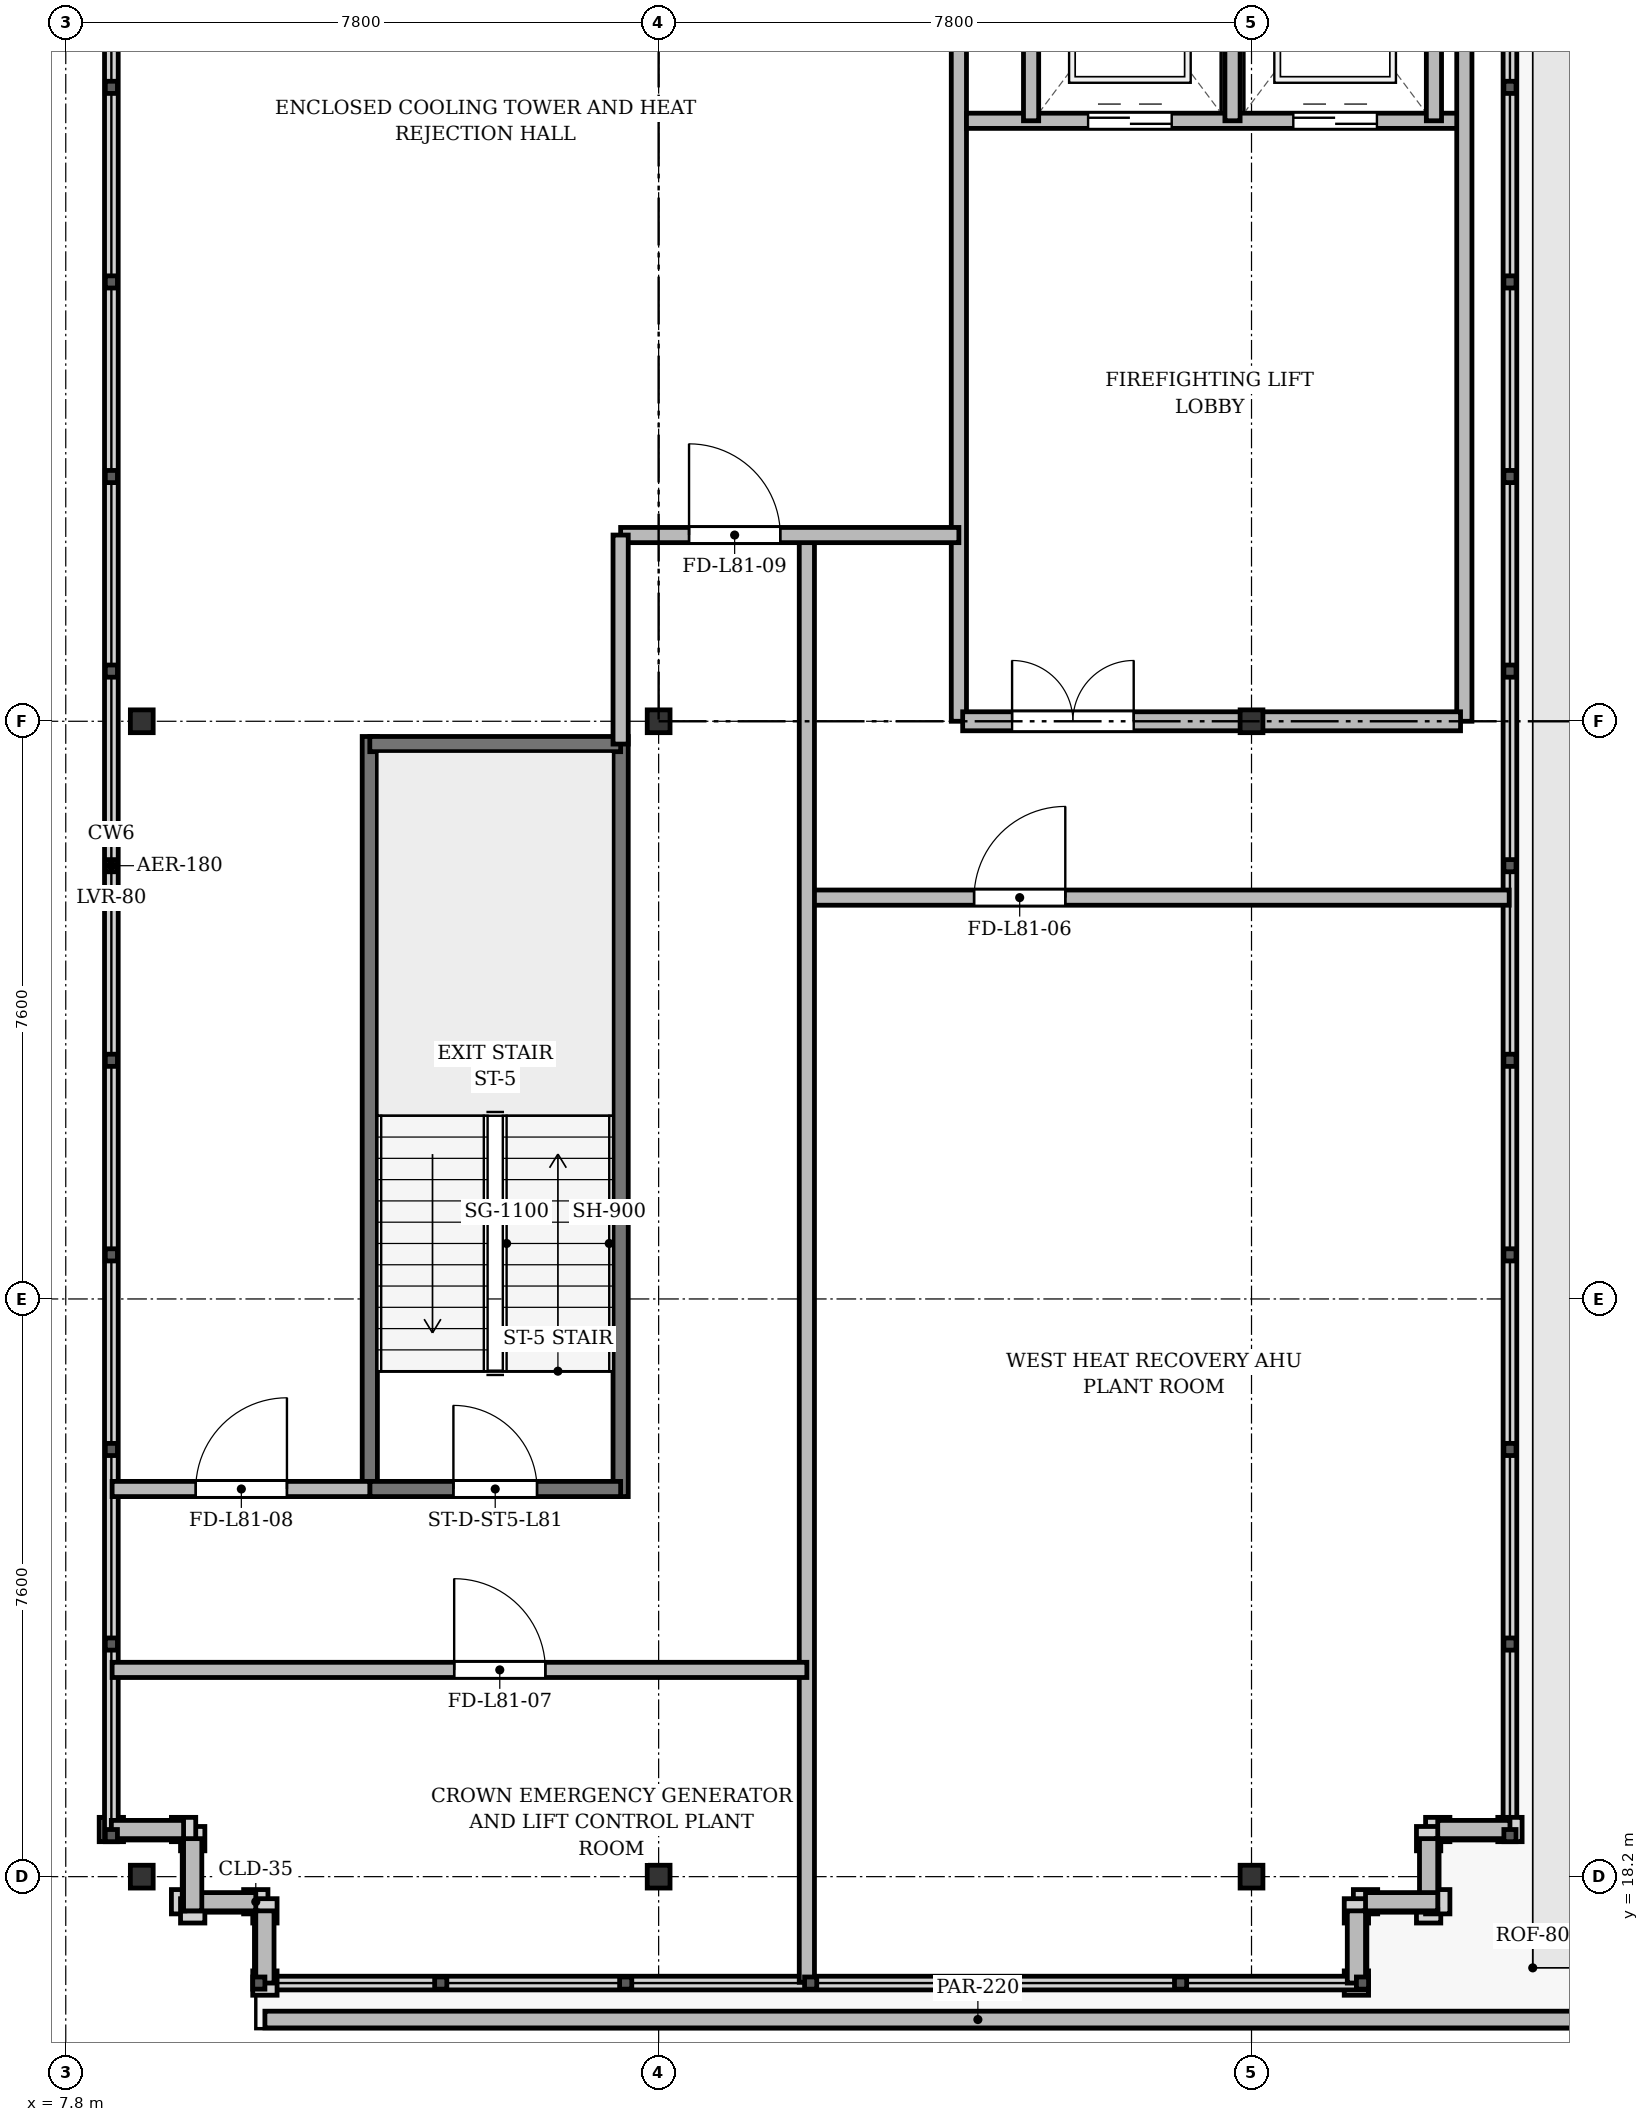
"""IFC4 building model, lengths in metres.
Left out: names, types, materials, properties, quantities, classifications, styles, units other than length and angle.
Written with IfcOpenShell. Run it as: python <this file> out.ifc"""

import sys

from ifc_helpers import new_model, si_unit, direction, frame, frame_2d, origin, origin_2d, place, context, subcontext, project, spatial, rectangle, i_section, extrude, source, transform, mapped, element, fill, save


model = new_model("IFC4")
c1 = context("Model", 3, precision=1e-05, world=origin(), true_north=direction((0.0, 1.0)))
c2 = subcontext(c1, "Body", "Model", "MODEL_VIEW")
j1 = project(units=[si_unit("LENGTHUNIT", "METRE"), si_unit("PLANEANGLEUNIT", "RADIAN")], contexts=[c1])
p1 = place(None, origin())
s1 = spatial("IfcSite", under=j1, at=p1, CompositionType="ELEMENT")
p2 = place(p1, origin())
s2 = spatial("IfcBuilding", under=s1, at=p2, CompositionType="ELEMENT")
p3 = place(p2, frame((0.0, 0.0, 312.3)))
s3 = spatial("IfcBuildingStorey", under=s2, at=p3, CompositionType="ELEMENT", Elevation=312.3)
m1 = source(origin(), c2, "Body", "SweptSolid", [
    extrude(i_section(OverallWidth=0.3, OverallDepth=0.3, WebThickness=0.015, FlangeThickness=0.024, at=origin_2d()), origin(), (0.0, 0.0, 1.0), 4.4),
])
for number, where, z_axis, x_axis in (
    (1, (8.8, 18.2, 0.0), (0.0, 0.0, 1.0), (1.0, 0.0, 0.0)),
    (2, (8.8, 33.4, 0.0), (0.0, 0.0, 1.0), (1.0, 0.0, 0.0)),
    (3, (15.6, 18.2, 0.0), (0.0, 0.0, 1.0), (1.0, 0.0, 0.0)),
    (4, (15.6, 33.4, 0.0), (0.0, 0.0, 1.0), (1.0, 0.0, 0.0)),
    (5, (23.4, 18.2, 0.0), (0.0, 0.0, 1.0), (1.0, 0.0, 0.0)),
    (6, (23.4, 33.4, 0.0), (0.0, 0.0, 1.0), (1.0, 0.0, 0.0)),
):
    element("IfcColumn", number, at=place(p3, frame(where, z_axis=z_axis, x_axis=x_axis)), inside=s3, PredefinedType="COLUMN", context=c2, shape_type="MappedRepresentation", body=[
        mapped(m1, transform((0.0, 0.0, 0.0), x_axis=(1.0, 0.0, 0.0), y_axis=(0.0, 1.0, 0.0), z_axis=(0.0, 0.0, 1.0), scale=1.0)),
    ])
p4 = place(p3, frame((10.3, 17.87, 0.0), z_axis=(0.0, 0.0, 1.0), x_axis=(-1.0, 0.0, 0.0)))
e7 = element("IfcWall", 7, at=p4, inside=s3, PredefinedType="SOLIDWALL", context=c2, shape_type="SweptSolid", body=[
    extrude(rectangle(XDim=0.95, YDim=0.24, at=frame_2d((0.475, 0.0))), origin(), (0.0, 0.0, 1.0), 4.11),
])
p5 = place(p3, frame((9.47, 17.75, 0.0), z_axis=(0.0, 0.0, 1.0), x_axis=(0.0, 1.0, 0.0)))
e8 = element("IfcWall", 8, at=p5, inside=s3, PredefinedType="SOLIDWALL", context=c2, shape_type="SweptSolid", body=[
    extrude(rectangle(XDim=0.95, YDim=0.24, at=frame_2d((0.475, 0.0))), origin(), (0.0, 0.0, 1.0), 3.61),
])
p6 = place(p3, frame((9.35, 18.82, 0.0), z_axis=(0.0, 0.0, 1.0), x_axis=(-1.0, 0.0, 0.0)))
e9 = element("IfcWall", 9, at=p6, inside=s3, PredefinedType="SOLIDWALL", context=c2, shape_type="SweptSolid", body=[
    extrude(rectangle(XDim=0.95, YDim=0.24, at=frame_2d((0.475, 0.0))), origin(), (0.0, 0.0, 1.0), 3.61),
])
p7 = place(p3, frame((26.8, 18.82, 0.0), z_axis=(0.0, 0.0, 1.0), x_axis=(-1.0, 0.0, 0.0)))
e10 = element("IfcWall", 10, at=p7, inside=s3, PredefinedType="SOLIDWALL", context=c2, shape_type="SweptSolid", body=[
    extrude(rectangle(XDim=0.95, YDim=0.24, at=frame_2d((0.475, 0.0))), origin(), (0.0, 0.0, 1.0), 4.11),
])
p8 = place(p3, frame((25.73, 18.7, 0.0), z_axis=(0.0, 0.0, 1.0), x_axis=(0.0, -1.0, 0.0)))
e11 = element("IfcWall", 11, at=p8, inside=s3, PredefinedType="SOLIDWALL", context=c2, shape_type="SweptSolid", body=[
    extrude(rectangle(XDim=0.95, YDim=0.24, at=frame_2d((0.475, 0.0))), origin(), (0.0, 0.0, 1.0), 3.61),
])
p9 = place(p3, frame((25.85, 17.87, 0.0), z_axis=(0.0, 0.0, 1.0), x_axis=(-1.0, 0.0, 0.0)))
e12 = element("IfcWall", 12, at=p9, inside=s3, PredefinedType="SOLIDWALL", context=c2, shape_type="SweptSolid", body=[
    extrude(rectangle(XDim=0.95, YDim=0.24, at=frame_2d((0.475, 0.0))), origin(), (0.0, 0.0, 1.0), 4.11),
])
for number, where, z_axis, x_axis in (
    (13, (24.78, 17.75, 0.0), (0.0, 0.0, 1.0), (0.0, -1.0, 0.0)),
    (14, (10.42, 16.8, 0.0), (0.0, 0.0, 1.0), (0.0, 1.0, 0.0)),
):
    element("IfcWall", number, at=place(p3, frame(where, z_axis=z_axis, x_axis=x_axis)), inside=s3, PredefinedType="SOLIDWALL", context=c2, shape_type="SweptSolid", body=[
        extrude(rectangle(XDim=0.95, YDim=0.24, at=frame_2d((0.475, 0.0))), origin(), (0.0, 0.0, 1.0), 4.11),
    ])
p10 = place(p3, frame((29.18, 16.32, 0.0), z_axis=(0.0, 0.0, 1.0), x_axis=(-1.0, 0.0, 0.0)))
e15 = element("IfcWall", 15, at=p10, inside=s3, PredefinedType="PARAPET", context=c2, shape_type="SweptSolid", body=[
    extrude(rectangle(XDim=18.76, YDim=0.22, at=frame_2d((9.38, 0.0))), origin(), (0.0, 0.0, 1.0), 1.08),
])
for number, where, z_axis, x_axis in (
    (16, (11.8, 23.2, 0.0), (0.0, 0.0, 1.0), (0.0, 1.0, 0.0)),
    (17, (15.1, 23.2, 0.0), (0.0, 0.0, 1.0), (0.0, 1.0, 0.0)),
):
    element("IfcWall", number, at=place(p3, frame(where, z_axis=z_axis, x_axis=x_axis)), inside=s3, PredefinedType="SHEAR", context=c2, shape_type="SweptSolid", body=[
        extrude(rectangle(XDim=10.0, YDim=0.2, at=frame_2d((5.0, 0.0))), origin(), (0.0, 0.0, 1.0), 4.11),
    ])
p11 = place(p3, frame((11.8, 33.1, 0.0), z_axis=(0.0, 0.0, 1.0), x_axis=(1.0, 0.0, 0.0)))
e18 = element("IfcWall", 18, at=p11, inside=s3, PredefinedType="SHEAR", context=c2, shape_type="SweptSolid", body=[
    extrude(rectangle(XDim=3.3, YDim=0.2, at=frame_2d((1.65, 0.0))), origin(), (0.0, 0.0, 1.0), 4.11),
])
p12 = place(p3, frame((11.8, 23.3, 0.0), z_axis=(0.0, 0.0, 1.0), x_axis=(1.0, 0.0, 0.0)))
e19 = element("IfcWall", 19, at=p12, inside=s3, PredefinedType="SHEAR", context=c2, shape_type="SweptSolid", body=[
    extrude(rectangle(XDim=3.3, YDim=0.2, at=frame_2d((1.65, 0.0))), origin(), (0.0, 0.0, 1.0), 4.11),
])
p13 = place(p12, frame((1.1, 0.0, 0.0)))
e20 = element("IfcOpeningElement", 20, at=p13, cuts=e19, PredefinedType="OPENING", context=c2, shape_type="SweptSolid", body=[
    extrude(rectangle(XDim=1.1, YDim=2.15, at=frame_2d((0.55, 1.075))), frame((0.0, 0.11, 0.0), z_axis=(0.0, -1.0, 0.0), x_axis=(1.0, 0.0, 0.0)), (0.0, 0.0, 1.0), 0.22),
])
p14 = place(p3, frame((19.55, 33.4, 0.0), z_axis=(0.0, 0.0, 1.0), x_axis=(0.0, 1.0, 0.0)))
e21 = element("IfcWall", 21, at=p14, inside=s3, PredefinedType="PARTITIONING", context=c2, shape_type="SweptSolid", body=[
    extrude(rectangle(XDim=11.3, YDim=0.2, at=frame_2d((5.65, 0.0))), origin(), (0.0, 0.0, 1.0), 3.61),
])
p15 = place(p3, frame((19.65, 41.3, 0.0), z_axis=(0.0, 0.0, 1.0), x_axis=(1.0, 0.0, 0.0)))
e22 = element("IfcWall", 22, at=p15, inside=s3, PredefinedType="SOLIDWALL", context=c2, shape_type="SweptSolid", body=[
    extrude(rectangle(XDim=6.5, YDim=0.2, at=frame_2d((3.25, 0.0))), origin(), (0.0, 0.0, 1.0), 4.11),
])
p16 = place(p15, frame((1.6, 0.0, 0.0)))
e23 = element("IfcOpeningElement", 23, at=p16, cuts=e22, PredefinedType="OPENING", context=c2, shape_type="SweptSolid", body=[
    extrude(rectangle(XDim=1.1, YDim=2.15, at=frame_2d((0.55, 1.075))), frame((0.0, 0.11, 0.0), z_axis=(0.0, -1.0, 0.0), x_axis=(1.0, 0.0, 0.0)), (0.0, 0.0, 1.0), 0.22),
])
p17 = place(p15, frame((4.3, 0.0, 0.0)))
e24 = element("IfcOpeningElement", 24, at=p17, cuts=e22, PredefinedType="OPENING", context=c2, shape_type="SweptSolid", body=[
    extrude(rectangle(XDim=1.1, YDim=2.15, at=frame_2d((0.55, 1.075))), frame((0.0, 0.11, 0.0), z_axis=(0.0, -1.0, 0.0), x_axis=(1.0, 0.0, 0.0)), (0.0, 0.0, 1.0), 0.22),
])
for number, where, z_axis, x_axis in (
    (25, (20.5, 41.3, 0.0), (0.0, 0.0, 1.0), (0.0, 1.0, 0.0)),
    (26, (23.15, 41.3, 0.0), (0.0, 0.0, 1.0), (0.0, 1.0, 0.0)),
):
    element("IfcWall", number, at=place(p3, frame(where, z_axis=z_axis, x_axis=x_axis)), inside=s3, PredefinedType="SOLIDWALL", context=c2, shape_type="SweptSolid", body=[
        extrude(rectangle(XDim=3.4, YDim=0.2, at=frame_2d((1.7, 0.0))), origin(), (0.0, 0.0, 1.0), 4.11),
    ])
p18 = place(p3, frame((25.8, 41.3, 0.0), z_axis=(0.0, 0.0, 1.0), x_axis=(0.0, 1.0, 0.0)))
e27 = element("IfcWall", 27, at=p18, inside=s3, PredefinedType="SOLIDWALL", context=c2, shape_type="SweptSolid", body=[
    extrude(rectangle(XDim=2.86, YDim=0.2, at=frame_2d((1.43, 0.0))), origin(), (0.0, 0.0, 1.0), 4.11),
])
p19 = place(p3, frame((26.2, 33.4, 0.0), z_axis=(0.0, 0.0, 1.0), x_axis=(0.0, 1.0, 0.0)))
e28 = element("IfcWall", 28, at=p19, inside=s3, PredefinedType="SOLIDWALL", context=c2, shape_type="SweptSolid", body=[
    extrude(rectangle(XDim=10.76, YDim=0.2, at=frame_2d((5.38, 0.0))), origin(), (0.0, 0.0, 1.0), 3.61),
])
p20 = place(p3, frame((19.6, 33.4, 0.0), z_axis=(0.0, 0.0, 1.0), x_axis=(1.0, 0.0, 0.0)))
e29 = element("IfcWall", 29, at=p20, inside=s3, PredefinedType="PARTITIONING", context=c2, shape_type="SweptSolid", body=[
    extrude(rectangle(XDim=6.55, YDim=0.25, at=frame_2d((3.275, 0.0))), origin(), (0.0, 0.0, 1.0), 3.61),
])
p21 = place(p20, frame((0.65, 0.0, 0.0)))
e30 = element("IfcOpeningElement", 30, at=p21, cuts=e29, PredefinedType="OPENING", context=c2, shape_type="SweptSolid", body=[
    extrude(rectangle(XDim=1.6, YDim=2.2, at=frame_2d((0.8, 1.1))), frame((0.0, 0.135, 0.0), z_axis=(0.0, -1.0, 0.0), x_axis=(1.0, 0.0, 0.0)), (0.0, 0.0, 1.0), 0.27),
])
p22 = place(p3, frame((17.55, 31.08, 0.0), z_axis=(0.0, 0.0, 1.0), x_axis=(1.0, 0.0, 0.0)))
e31 = element("IfcWall", 31, at=p22, inside=s3, PredefinedType="PARTITIONING", context=c2, shape_type="SweptSolid", body=[
    extrude(rectangle(XDim=9.24, YDim=0.2, at=frame_2d((4.62, 0.0))), origin(), (0.0, 0.0, 1.0), 3.61),
])
p23 = place(p22, frame((2.2, 0.0, 0.0)))
e32 = element("IfcOpeningElement", 32, at=p23, cuts=e31, PredefinedType="OPENING", context=c2, shape_type="SweptSolid", body=[
    extrude(rectangle(XDim=1.2, YDim=2.15, at=frame_2d((0.6, 1.075))), frame((0.0, 0.11, 0.0), z_axis=(0.0, -1.0, 0.0), x_axis=(1.0, 0.0, 0.0)), (0.0, 0.0, 1.0), 0.22),
])
p24 = place(p3, frame((17.55, 16.81, 0.0), z_axis=(0.0, 0.0, 1.0), x_axis=(0.0, 1.0, 0.0)))
e33 = element("IfcWall", 33, at=p24, inside=s3, PredefinedType="PARTITIONING", context=c2, shape_type="SweptSolid", body=[
    extrude(rectangle(XDim=19.04, YDim=0.2, at=frame_2d((9.52, 0.0))), origin(), (0.0, 0.0, 1.0), 3.61),
])
p25 = place(p3, frame((8.41, 20.92, 0.0), z_axis=(0.0, 0.0, 1.0), x_axis=(1.0, 0.0, 0.0)))
e34 = element("IfcWall", 34, at=p25, inside=s3, PredefinedType="PARTITIONING", context=c2, shape_type="SweptSolid", body=[
    extrude(rectangle(XDim=9.14, YDim=0.2, at=frame_2d((4.57, 0.0))), origin(), (0.0, 0.0, 1.0), 3.61),
])
p26 = place(p25, frame((4.5, 0.0, 0.0)))
e35 = element("IfcOpeningElement", 35, at=p26, cuts=e34, PredefinedType="OPENING", context=c2, shape_type="SweptSolid", body=[
    extrude(rectangle(XDim=1.2, YDim=2.15, at=frame_2d((0.6, 1.075))), frame((0.0, 0.11, 0.0), z_axis=(0.0, -1.0, 0.0), x_axis=(1.0, 0.0, 0.0)), (0.0, 0.0, 1.0), 0.22),
])
p27 = place(p3, frame((8.41, 23.3, 0.0), z_axis=(0.0, 0.0, 1.0), x_axis=(1.0, 0.0, 0.0)))
e36 = element("IfcWall", 36, at=p27, inside=s3, PredefinedType="PARTITIONING", context=c2, shape_type="SweptSolid", body=[
    extrude(rectangle(XDim=3.39, YDim=0.2, at=frame_2d((1.695, 0.0))), origin(), (0.0, 0.0, 1.0), 3.61),
])
p28 = place(p27, frame((1.1, 0.0, 0.0)))
e37 = element("IfcOpeningElement", 37, at=p28, cuts=e36, PredefinedType="OPENING", context=c2, shape_type="SweptSolid", body=[
    extrude(rectangle(XDim=1.2, YDim=2.15, at=frame_2d((0.6, 1.075))), frame((0.0, 0.11, 0.0), z_axis=(0.0, -1.0, 0.0), x_axis=(1.0, 0.0, 0.0)), (0.0, 0.0, 1.0), 0.22),
])
p29 = place(p3, frame((15.1, 35.85, 0.0), z_axis=(0.0, 0.0, 1.0), x_axis=(1.0, 0.0, 0.0)))
e38 = element("IfcWall", 38, at=p29, inside=s3, PredefinedType="PARTITIONING", context=c2, shape_type="SweptSolid", body=[
    extrude(rectangle(XDim=4.45, YDim=0.2, at=frame_2d((2.225, 0.0))), origin(), (0.0, 0.0, 1.0), 3.61),
])
p30 = place(p29, frame((0.9, 0.0, 0.0)))
e39 = element("IfcOpeningElement", 39, at=p30, cuts=e38, PredefinedType="OPENING", context=c2, shape_type="SweptSolid", body=[
    extrude(rectangle(XDim=1.2, YDim=2.15, at=frame_2d((0.6, 1.075))), frame((0.0, 0.11, 0.0), z_axis=(0.0, -1.0, 0.0), x_axis=(1.0, 0.0, 0.0)), (0.0, 0.0, 1.0), 0.22),
])
p31 = place(p3, frame((15.1, 33.1, 0.0), z_axis=(0.0, 0.0, 1.0), x_axis=(0.0, 1.0, 0.0)))
e40 = element("IfcWall", 40, at=p31, inside=s3, PredefinedType="PARTITIONING", context=c2, shape_type="SweptSolid", body=[
    extrude(rectangle(XDim=2.75, YDim=0.2, at=frame_2d((1.375, 0.0))), origin(), (0.0, 0.0, 1.0), 3.61),
])
m2 = source(origin(), c2, "Body", "SweptSolid", [
    extrude(rectangle(XDim=1.1, YDim=2.15, at=frame_2d((0.55, 1.075))), frame((0.0, 0.025, 0.0), z_axis=(0.0, -1.0, 0.0), x_axis=(1.0, 0.0, 0.0)), (0.0, 0.0, 1.0), 0.05),
])
p32 = place(p13, origin())
e41 = element("IfcDoor", 41, at=p32, inside=s3, OperationType="SINGLE_SWING_LEFT", PredefinedType="DOOR", context=c2, shape_type="MappedRepresentation", body=[
    mapped(m2, transform((0.0, 0.0, 0.0), x_axis=(1.0, 0.0, 0.0), y_axis=(0.0, 1.0, 0.0), z_axis=(0.0, 0.0, 1.0), scale=1.0)),
])
fill(e20, e41)
p33 = place(p16, origin())
e42 = element("IfcDoor", 42, at=p33, inside=s3, OperationType="DOUBLE_DOOR_SLIDING", PredefinedType="DOOR", context=c2, shape_type="MappedRepresentation", body=[
    mapped(m2, transform((0.0, 0.0, 0.0), x_axis=(1.0, 0.0, 0.0), y_axis=(0.0, 1.0, 0.0), z_axis=(0.0, 0.0, 1.0), scale=1.0)),
])
fill(e23, e42)
p34 = place(p17, origin())
e43 = element("IfcDoor", 43, at=p34, inside=s3, OperationType="DOUBLE_DOOR_SLIDING", PredefinedType="DOOR", context=c2, shape_type="MappedRepresentation", body=[
    mapped(m2, transform((0.0, 0.0, 0.0), x_axis=(1.0, 0.0, 0.0), y_axis=(0.0, 1.0, 0.0), z_axis=(0.0, 0.0, 1.0), scale=1.0)),
])
fill(e24, e43)
m3 = source(origin(), c2, "Body", "SweptSolid", [
    extrude(rectangle(XDim=1.6, YDim=2.2, at=frame_2d((0.8, 1.1))), frame((0.0, 0.025, 0.0), z_axis=(0.0, -1.0, 0.0), x_axis=(1.0, 0.0, 0.0)), (0.0, 0.0, 1.0), 0.05),
])
p35 = place(p21, origin())
e44 = element("IfcDoor", 44, at=p35, inside=s3, OperationType="DOUBLE_DOOR_SINGLE_SWING", PredefinedType="DOOR", context=c2, shape_type="MappedRepresentation", body=[
    mapped(m3, transform((0.0, 0.0, 0.0), x_axis=(1.0, 0.0, 0.0), y_axis=(0.0, 1.0, 0.0), z_axis=(0.0, 0.0, 1.0), scale=1.0)),
])
fill(e30, e44)
m4 = source(origin(), c2, "Body", "SweptSolid", [
    extrude(rectangle(XDim=1.2, YDim=2.15, at=frame_2d((0.6, 1.075))), frame((0.0, 0.025, 0.0), z_axis=(0.0, -1.0, 0.0), x_axis=(1.0, 0.0, 0.0)), (0.0, 0.0, 1.0), 0.05),
])
p36 = place(p23, origin())
e45 = element("IfcDoor", 45, at=p36, inside=s3, OperationType="SINGLE_SWING_RIGHT", PredefinedType="DOOR", context=c2, shape_type="MappedRepresentation", body=[
    mapped(m4, transform((0.0, 0.0, 0.0), x_axis=(1.0, 0.0, 0.0), y_axis=(0.0, 1.0, 0.0), z_axis=(0.0, 0.0, 1.0), scale=1.0)),
])
fill(e32, e45)
p37 = place(p26, origin())
e46 = element("IfcDoor", 46, at=p37, inside=s3, OperationType="SINGLE_SWING_LEFT", PredefinedType="DOOR", context=c2, shape_type="MappedRepresentation", body=[
    mapped(m4, transform((0.0, 0.0, 0.0), x_axis=(1.0, 0.0, 0.0), y_axis=(0.0, 1.0, 0.0), z_axis=(0.0, 0.0, 1.0), scale=1.0)),
])
fill(e35, e46)
p38 = place(p28, origin())
e47 = element("IfcDoor", 47, at=p38, inside=s3, OperationType="SINGLE_SWING_RIGHT", PredefinedType="DOOR", context=c2, shape_type="MappedRepresentation", body=[
    mapped(m4, transform((0.0, 0.0, 0.0), x_axis=(1.0, 0.0, 0.0), y_axis=(0.0, 1.0, 0.0), z_axis=(0.0, 0.0, 1.0), scale=1.0)),
])
fill(e37, e47)
p39 = place(p30, origin())
e48 = element("IfcDoor", 48, at=p39, inside=s3, OperationType="SINGLE_SWING_LEFT", PredefinedType="DOOR", context=c2, shape_type="MappedRepresentation", body=[
    mapped(m4, transform((0.0, 0.0, 0.0), x_axis=(1.0, 0.0, 0.0), y_axis=(0.0, 1.0, 0.0), z_axis=(0.0, 0.0, 1.0), scale=1.0)),
])
fill(e39, e48)
save(model, sys.argv[1])
